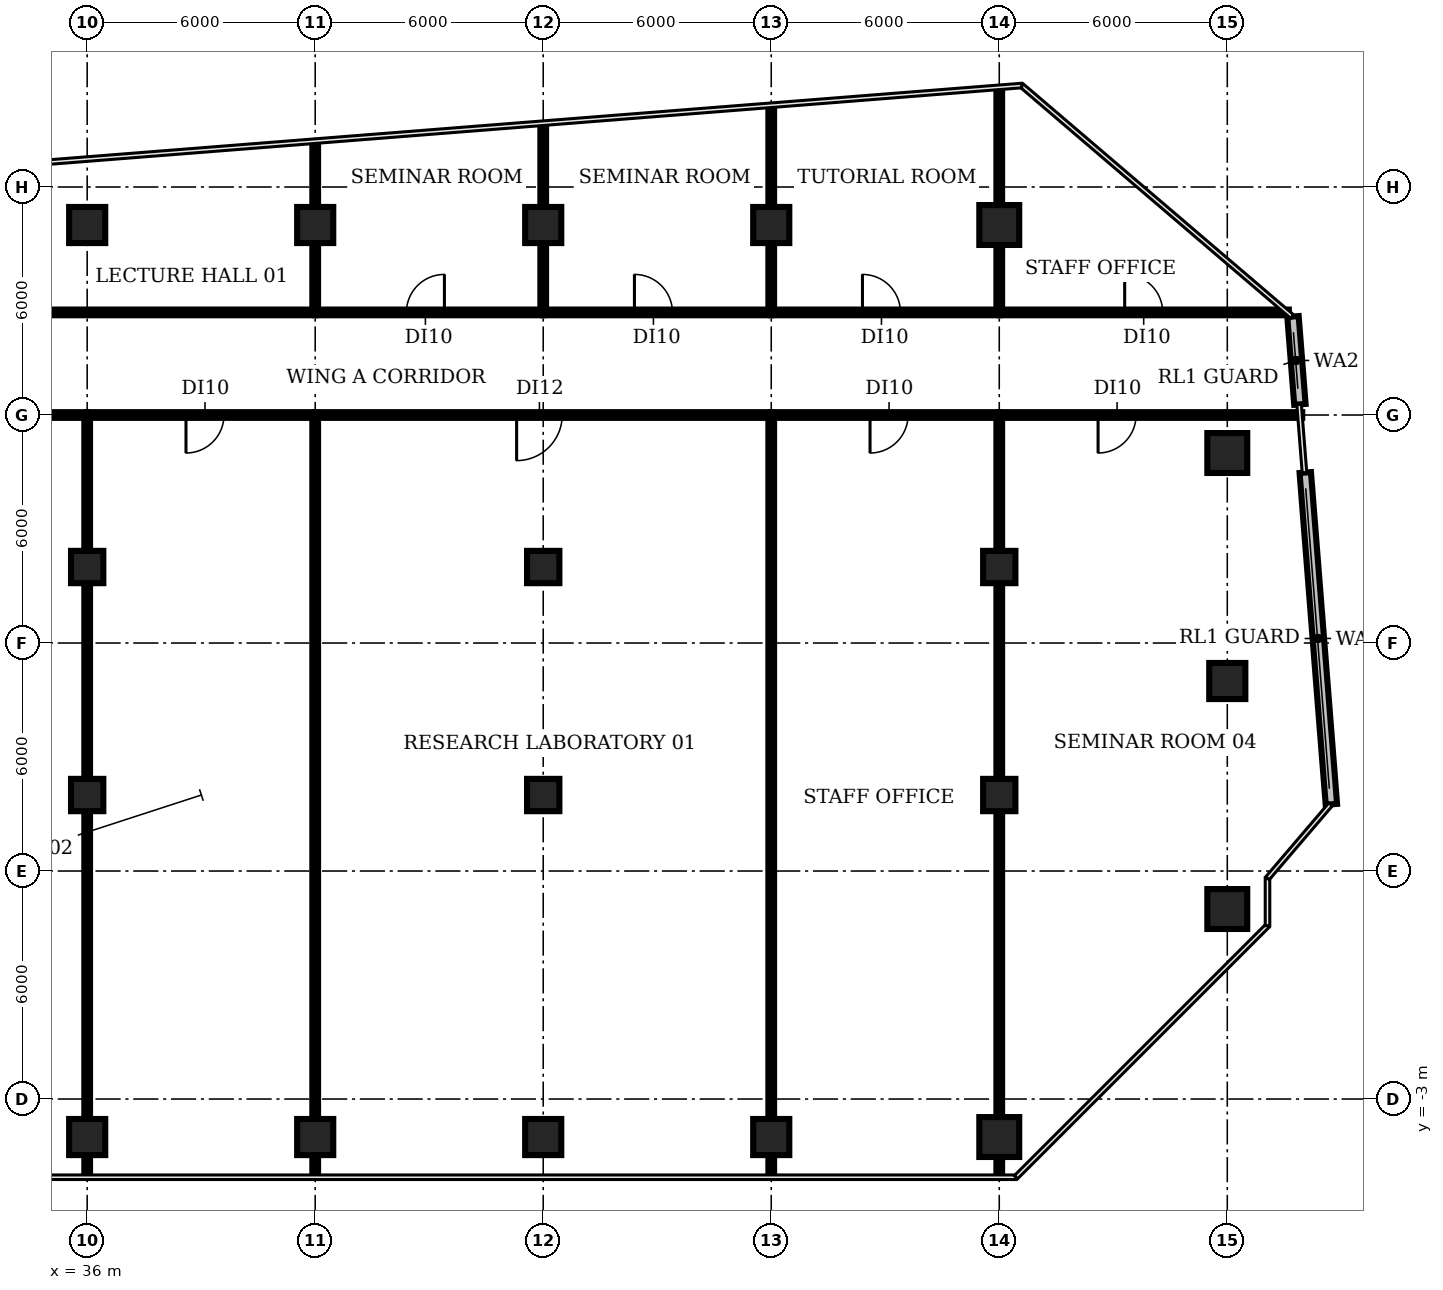
"""IFC4 building model, lengths in metres.
Left out: names, types, materials, properties, quantities, classifications, styles, units other than length and angle.
Written with IfcOpenShell. Run it as: python <this file> out.ifc"""

import sys

from ifc_helpers import new_model, si_unit, direction, frame, frame_2d, origin, origin_2d, place, context, subcontext, project, spatial, rectangle, circle, extrude, element, fill, save


model = new_model("IFC4")
c1 = context("Model", 3, precision=1e-05, world=origin(), true_north=direction((0.0, 1.0)))
c2 = subcontext(c1, "Body", "Model", "MODEL_VIEW")
j1 = project(units=[si_unit("LENGTHUNIT", "METRE"), si_unit("PLANEANGLEUNIT", "RADIAN")], contexts=[c1])
p1 = place(None, origin())
s1 = spatial("IfcSite", under=j1, at=p1, CompositionType="ELEMENT")
p2 = place(p1, origin())
s2 = spatial("IfcBuilding", under=s1, at=p2, CompositionType="ELEMENT")
p3 = place(p2, frame((0.0, 0.0, 71.0)))
s3 = spatial("IfcBuildingStorey", under=s2, at=p3, CompositionType="ELEMENT", Elevation=71.0)
p4 = place(p3, frame((36.0, -4.0, 0.0), z_axis=(0.0, 0.0, 1.0), x_axis=(1.0, 0.0, 0.0)))
e1 = element("IfcColumn", 1, at=p4, inside=s3, PredefinedType="COLUMN", context=c2, shape_type="SweptSolid", body=[
    extrude(rectangle(XDim=0.95, YDim=0.95, at=origin_2d()), origin(), (0.0, 0.0, 1.0), 3.85),
])
for number, where, z_axis, x_axis in (
    (2, (36.0, 5.0, 0.0), (0.0, 0.0, 1.0), (1.0, 0.0, 0.0)),
    (3, (36.0, 11.0, 0.0), (0.0, 0.0, 1.0), (1.0, 0.0, 0.0)),
):
    element("IfcColumn", number, at=place(p3, frame(where, z_axis=z_axis, x_axis=x_axis)), inside=s3, PredefinedType="COLUMN", context=c2, shape_type="SweptSolid", body=[
        extrude(rectangle(XDim=0.85, YDim=0.85, at=origin_2d()), origin(), (0.0, 0.0, 1.0), 3.85),
    ])
for number, where, z_axis, x_axis in (
    (4, (36.0, 20.0, 0.0), (0.0, 0.0, 1.0), (1.0, 0.0, 0.0)),
    (5, (42.0, -4.0, 0.0), (0.0, 0.0, 1.0), (1.0, 0.0, 0.0)),
    (6, (42.0, 20.0, 0.0), (0.0, 0.0, 1.0), (1.0, 0.0, 0.0)),
    (7, (48.0, -4.0, 0.0), (0.0, 0.0, 1.0), (1.0, 0.0, 0.0)),
):
    element("IfcColumn", number, at=place(p3, frame(where, z_axis=z_axis, x_axis=x_axis)), inside=s3, PredefinedType="COLUMN", context=c2, shape_type="SweptSolid", body=[
        extrude(rectangle(XDim=0.95, YDim=0.95, at=origin_2d()), origin(), (0.0, 0.0, 1.0), 3.85),
    ])
for number, where, z_axis, x_axis in (
    (8, (48.0, 5.0, 0.0), (0.0, 0.0, 1.0), (1.0, 0.0, 0.0)),
    (9, (48.0, 11.0, 0.0), (0.0, 0.0, 1.0), (1.0, 0.0, 0.0)),
):
    element("IfcColumn", number, at=place(p3, frame(where, z_axis=z_axis, x_axis=x_axis)), inside=s3, PredefinedType="COLUMN", context=c2, shape_type="SweptSolid", body=[
        extrude(rectangle(XDim=0.85, YDim=0.85, at=origin_2d()), origin(), (0.0, 0.0, 1.0), 3.85),
    ])
for number, where, z_axis, x_axis in (
    (10, (48.0, 20.0, 0.0), (0.0, 0.0, 1.0), (1.0, 0.0, 0.0)),
    (11, (54.0, -4.0, 0.0), (0.0, 0.0, 1.0), (1.0, 0.0, 0.0)),
    (12, (54.0, 20.0, 0.0), (0.0, 0.0, 1.0), (1.0, 0.0, 0.0)),
):
    element("IfcColumn", number, at=place(p3, frame(where, z_axis=z_axis, x_axis=x_axis)), inside=s3, PredefinedType="COLUMN", context=c2, shape_type="SweptSolid", body=[
        extrude(rectangle(XDim=0.95, YDim=0.95, at=origin_2d()), origin(), (0.0, 0.0, 1.0), 3.85),
    ])
p5 = place(p3, frame((60.0, -4.0, 0.0), z_axis=(0.0, 0.0, 1.0), x_axis=(1.0, 0.0, 0.0)))
e13 = element("IfcColumn", 13, at=p5, inside=s3, PredefinedType="COLUMN", context=c2, shape_type="SweptSolid", body=[
    extrude(circle(Radius=0.525, at=origin_2d()), origin(), (0.0, 0.0, 1.0), 3.85),
])
for number, where, z_axis, x_axis in (
    (14, (60.0, 5.0, 0.0), (0.0, 0.0, 1.0), (1.0, 0.0, 0.0)),
    (15, (60.0, 11.0, 0.0), (0.0, 0.0, 1.0), (1.0, 0.0, 0.0)),
):
    element("IfcColumn", number, at=place(p3, frame(where, z_axis=z_axis, x_axis=x_axis)), inside=s3, PredefinedType="COLUMN", context=c2, shape_type="SweptSolid", body=[
        extrude(rectangle(XDim=0.85, YDim=0.85, at=origin_2d()), origin(), (0.0, 0.0, 1.0), 3.85),
    ])
for number, where, z_axis, x_axis in (
    (16, (60.0, 20.0, 0.0), (0.0, 0.0, 1.0), (1.0, 0.0, 0.0)),
    (17, (66.0, 2.0, 0.0), (0.0, 0.0, 1.0), (1.0, 0.0, 0.0)),
):
    element("IfcColumn", number, at=place(p3, frame(where, z_axis=z_axis, x_axis=x_axis)), inside=s3, PredefinedType="COLUMN", context=c2, shape_type="SweptSolid", body=[
        extrude(circle(Radius=0.525, at=origin_2d()), origin(), (0.0, 0.0, 1.0), 3.85),
    ])
p6 = place(p3, frame((66.0, 8.0, 0.0), z_axis=(0.0, 0.0, 1.0), x_axis=(1.0, 0.0, 0.0)))
e18 = element("IfcColumn", 18, at=p6, inside=s3, PredefinedType="COLUMN", context=c2, shape_type="SweptSolid", body=[
    extrude(rectangle(XDim=0.95, YDim=0.95, at=origin_2d()), origin(), (0.0, 0.0, 1.0), 3.85),
])
p7 = place(p3, frame((66.0, 14.0, 0.0), z_axis=(0.0, 0.0, 1.0), x_axis=(1.0, 0.0, 0.0)))
e19 = element("IfcColumn", 19, at=p7, inside=s3, PredefinedType="COLUMN", context=c2, shape_type="SweptSolid", body=[
    extrude(circle(Radius=0.525, at=origin_2d()), origin(), (0.0, 0.0, 1.0), 3.85),
])
p8 = place(p3, frame((68.739, 4.755, 0.0), z_axis=(0.0, 0.0, 1.0), x_axis=(-0.07845094055, 0.996917975526, 0.0)))
e20 = element("IfcWall", 20, at=p8, inside=s3, PredefinedType="SOLIDWALL", context=c2, shape_type="SweptSolid", body=[
    extrude(rectangle(XDim=8.757, YDim=0.3, at=frame_2d((4.379, 0.0))), origin(), (0.0, 0.0, 1.0), 3.85),
])
p9 = place(p3, frame((67.911, 15.28, 0.0), z_axis=(0.0, 0.0, 1.0), x_axis=(-0.078427168451, 0.99691984595, 0.0)))
e21 = element("IfcWall", 21, at=p9, inside=s3, PredefinedType="SOLIDWALL", context=c2, shape_type="SweptSolid", body=[
    extrude(rectangle(XDim=2.319, YDim=0.3, at=frame_2d((1.16, 0.0))), origin(), (0.0, 0.0, 1.0), 3.85),
])
p10 = place(p3, frame((27.6, 15.0, 0.0), z_axis=(0.0, 0.0, 1.0), x_axis=(1.0, 0.0, 0.0)))
e22 = element("IfcWall", 22, at=p10, inside=s3, PredefinedType="PARTITIONING", context=c2, shape_type="SweptSolid", body=[
    extrude(rectangle(XDim=8.4, YDim=0.15, at=frame_2d((4.2, 0.0))), origin(), (0.0, 0.0, 1.0), 2.83),
])
for number, where, z_axis, x_axis in (
    (23, (36.0, -5.01, 0.0), (0.0, 0.0, 1.0), (0.0, 1.0, 0.0)),
    (24, (42.0, -5.01, 0.0), (0.0, 0.0, 1.0), (0.0, 1.0, 0.0)),
):
    element("IfcWall", number, at=place(p3, frame(where, z_axis=z_axis, x_axis=x_axis)), inside=s3, PredefinedType="PARTITIONING", context=c2, shape_type="SweptSolid", body=[
        extrude(rectangle(XDim=20.01, YDim=0.15, at=frame_2d((10.005, 0.0))), origin(), (0.0, 0.0, 1.0), 2.83),
    ])
p11 = place(p3, frame((42.0, 15.0, 0.0), z_axis=(0.0, 0.0, 1.0), x_axis=(-1.0, 0.0, 0.0)))
e25 = element("IfcWall", 25, at=p11, inside=s3, PredefinedType="PARTITIONING", context=c2, shape_type="SweptSolid", body=[
    extrude(rectangle(XDim=6.0, YDim=0.15, at=frame_2d((3.0, 0.0))), origin(), (0.0, 0.0, 1.0), 2.83),
])
p12 = place(p11, frame((2.4, 0.0, 0.0)))
e26 = element("IfcOpeningElement", 26, at=p12, cuts=e25, PredefinedType="OPENING", context=c2, shape_type="SweptSolid", body=[
    extrude(rectangle(XDim=1.0, YDim=2.1, at=frame_2d((0.5, 1.05))), frame((0.0, 0.085, 0.0), z_axis=(0.0, -1.0, 0.0), x_axis=(1.0, 0.0, 0.0)), (0.0, 0.0, 1.0), 0.17),
])
p13 = place(p3, frame((42.0, 17.7, 0.0), z_axis=(0.0, 0.0, 1.0), x_axis=(-1.0, 0.0, 0.0)))
e27 = element("IfcWall", 27, at=p13, inside=s3, PredefinedType="PARTITIONING", context=c2, shape_type="SweptSolid", body=[
    extrude(rectangle(XDim=14.4, YDim=0.15, at=frame_2d((7.2, 0.0))), origin(), (0.0, 0.0, 1.0), 2.83),
])
p14 = place(p13, frame((7.1, 0.0, 0.0)))
e28 = element("IfcOpeningElement", 28, at=p14, cuts=e27, PredefinedType="OPENING", context=c2, shape_type="SweptSolid", body=[
    extrude(rectangle(XDim=1.8, YDim=2.1, at=frame_2d((0.9, 1.05))), frame((0.0, 0.085, 0.0), z_axis=(0.0, -1.0, 0.0), x_axis=(1.0, 0.0, 0.0)), (0.0, 0.0, 1.0), 0.17),
])
p15 = place(p3, frame((42.0, 17.7, 0.0), z_axis=(0.0, 0.0, 1.0), x_axis=(0.0, 1.0, 0.0)))
e29 = element("IfcWall", 29, at=p15, inside=s3, PredefinedType="PARTITIONING", context=c2, shape_type="SweptSolid", body=[
    extrude(rectangle(XDim=4.46, YDim=0.15, at=frame_2d((2.23, 0.0))), origin(), (0.0, 0.0, 1.0), 2.83),
])
p16 = place(p3, frame((42.0, 17.7, 0.0), z_axis=(0.0, 0.0, 1.0), x_axis=(1.0, 0.0, 0.0)))
e30 = element("IfcWall", 30, at=p16, inside=s3, PredefinedType="PARTITIONING", context=c2, shape_type="SweptSolid", body=[
    extrude(rectangle(XDim=6.0, YDim=0.15, at=frame_2d((3.0, 0.0))), origin(), (0.0, 0.0, 1.0), 2.83),
])
p17 = place(p16, frame((2.4, 0.0, 0.0)))
e31 = element("IfcOpeningElement", 31, at=p17, cuts=e30, PredefinedType="OPENING", context=c2, shape_type="SweptSolid", body=[
    extrude(rectangle(XDim=1.0, YDim=2.1, at=frame_2d((0.5, 1.05))), frame((0.0, 0.085, 0.0), z_axis=(0.0, -1.0, 0.0), x_axis=(1.0, 0.0, 0.0)), (0.0, 0.0, 1.0), 0.17),
])
p18 = place(p3, frame((48.0, 17.7, 0.0), z_axis=(0.0, 0.0, 1.0), x_axis=(0.0, 1.0, 0.0)))
e32 = element("IfcWall", 32, at=p18, inside=s3, PredefinedType="PARTITIONING", context=c2, shape_type="SweptSolid", body=[
    extrude(rectangle(XDim=4.93, YDim=0.15, at=frame_2d((2.465, 0.0))), origin(), (0.0, 0.0, 1.0), 2.83),
])
p19 = place(p3, frame((48.0, 17.7, 0.0), z_axis=(0.0, 0.0, 1.0), x_axis=(1.0, 0.0, 0.0)))
e33 = element("IfcWall", 33, at=p19, inside=s3, PredefinedType="PARTITIONING", context=c2, shape_type="SweptSolid", body=[
    extrude(rectangle(XDim=6.0, YDim=0.15, at=frame_2d((3.0, 0.0))), origin(), (0.0, 0.0, 1.0), 2.83),
])
p20 = place(p19, frame((2.4, 0.0, 0.0)))
e34 = element("IfcOpeningElement", 34, at=p20, cuts=e33, PredefinedType="OPENING", context=c2, shape_type="SweptSolid", body=[
    extrude(rectangle(XDim=1.0, YDim=2.1, at=frame_2d((0.5, 1.05))), frame((0.0, 0.085, 0.0), z_axis=(0.0, -1.0, 0.0), x_axis=(1.0, 0.0, 0.0)), (0.0, 0.0, 1.0), 0.17),
])
p21 = place(p3, frame((54.0, -4.993, 0.0), z_axis=(0.0, 0.0, 1.0), x_axis=(0.0, 1.0, 0.0)))
e35 = element("IfcWall", 35, at=p21, inside=s3, PredefinedType="PARTITIONING", context=c2, shape_type="SweptSolid", body=[
    extrude(rectangle(XDim=19.993, YDim=0.15, at=frame_2d((9.997, 0.0))), origin(), (0.0, 0.0, 1.0), 2.83),
])
p22 = place(p3, frame((54.0, 15.0, 0.0), z_axis=(0.0, 0.0, 1.0), x_axis=(-1.0, 0.0, 0.0)))
e36 = element("IfcWall", 36, at=p22, inside=s3, PredefinedType="PARTITIONING", context=c2, shape_type="SweptSolid", body=[
    extrude(rectangle(XDim=12.0, YDim=0.15, at=frame_2d((6.0, 0.0))), origin(), (0.0, 0.0, 1.0), 2.83),
])
p23 = place(p22, frame((5.5, 0.0, 0.0)))
e37 = element("IfcOpeningElement", 37, at=p23, cuts=e36, PredefinedType="OPENING", context=c2, shape_type="SweptSolid", body=[
    extrude(rectangle(XDim=1.2, YDim=2.1, at=frame_2d((0.6, 1.05))), frame((0.0, 0.085, 0.0), z_axis=(0.0, -1.0, 0.0), x_axis=(1.0, 0.0, 0.0)), (0.0, 0.0, 1.0), 0.17),
])
p24 = place(p3, frame((54.0, 17.7, 0.0), z_axis=(0.0, 0.0, 1.0), x_axis=(0.0, 1.0, 0.0)))
e38 = element("IfcWall", 38, at=p24, inside=s3, PredefinedType="PARTITIONING", context=c2, shape_type="SweptSolid", body=[
    extrude(rectangle(XDim=5.4, YDim=0.15, at=frame_2d((2.7, 0.0))), origin(), (0.0, 0.0, 1.0), 2.83),
])
p25 = place(p3, frame((54.0, 17.7, 0.0), z_axis=(0.0, 0.0, 1.0), x_axis=(1.0, 0.0, 0.0)))
e39 = element("IfcWall", 39, at=p25, inside=s3, PredefinedType="PARTITIONING", context=c2, shape_type="SweptSolid", body=[
    extrude(rectangle(XDim=6.0, YDim=0.15, at=frame_2d((3.0, 0.0))), origin(), (0.0, 0.0, 1.0), 2.83),
])
p26 = place(p25, frame((2.4, 0.0, 0.0)))
e40 = element("IfcOpeningElement", 40, at=p26, cuts=e39, PredefinedType="OPENING", context=c2, shape_type="SweptSolid", body=[
    extrude(rectangle(XDim=1.0, YDim=2.1, at=frame_2d((0.5, 1.05))), frame((0.0, 0.085, 0.0), z_axis=(0.0, -1.0, 0.0), x_axis=(1.0, 0.0, 0.0)), (0.0, 0.0, 1.0), 0.17),
])
p27 = place(p3, frame((60.0, -5.01, 0.0), z_axis=(0.0, 0.0, 1.0), x_axis=(0.0, 1.0, 0.0)))
e41 = element("IfcWall", 41, at=p27, inside=s3, PredefinedType="PARTITIONING", context=c2, shape_type="SweptSolid", body=[
    extrude(rectangle(XDim=20.01, YDim=0.15, at=frame_2d((10.005, 0.0))), origin(), (0.0, 0.0, 1.0), 2.83),
])
p28 = place(p3, frame((60.0, 15.0, 0.0), z_axis=(0.0, 0.0, 1.0), x_axis=(-1.0, 0.0, 0.0)))
e42 = element("IfcWall", 42, at=p28, inside=s3, PredefinedType="PARTITIONING", context=c2, shape_type="SweptSolid", body=[
    extrude(rectangle(XDim=6.0, YDim=0.15, at=frame_2d((3.0, 0.0))), origin(), (0.0, 0.0, 1.0), 2.83),
])
p29 = place(p28, frame((2.4, 0.0, 0.0)))
e43 = element("IfcOpeningElement", 43, at=p29, cuts=e42, PredefinedType="OPENING", context=c2, shape_type="SweptSolid", body=[
    extrude(rectangle(XDim=1.0, YDim=2.1, at=frame_2d((0.5, 1.05))), frame((0.0, 0.085, 0.0), z_axis=(0.0, -1.0, 0.0), x_axis=(1.0, 0.0, 0.0)), (0.0, 0.0, 1.0), 0.17),
])
p30 = place(p3, frame((60.0, 17.7, 0.0), z_axis=(0.0, 0.0, 1.0), x_axis=(0.0, 1.0, 0.0)))
e44 = element("IfcWall", 44, at=p30, inside=s3, PredefinedType="PARTITIONING", context=c2, shape_type="SweptSolid", body=[
    extrude(rectangle(XDim=5.87, YDim=0.15, at=frame_2d((2.935, 0.0))), origin(), (0.0, 0.0, 1.0), 2.83),
])
p31 = place(p3, frame((60.0, 17.7, 0.0), z_axis=(0.0, 0.0, 1.0), x_axis=(1.0, 0.0, 0.0)))
e45 = element("IfcWall", 45, at=p31, inside=s3, PredefinedType="PARTITIONING", context=c2, shape_type="SweptSolid", body=[
    extrude(rectangle(XDim=7.62, YDim=0.15, at=frame_2d((3.81, 0.0))), origin(), (0.0, 0.0, 1.0), 2.83),
])
p32 = place(p31, frame((3.3, 0.0, 0.0)))
e46 = element("IfcOpeningElement", 46, at=p32, cuts=e45, PredefinedType="OPENING", context=c2, shape_type="SweptSolid", body=[
    extrude(rectangle(XDim=1.0, YDim=2.1, at=frame_2d((0.5, 1.05))), frame((0.0, 0.085, 0.0), z_axis=(0.0, -1.0, 0.0), x_axis=(1.0, 0.0, 0.0)), (0.0, 0.0, 1.0), 0.17),
])
p33 = place(p3, frame((67.972, 15.0, 0.0), z_axis=(0.0, 0.0, 1.0), x_axis=(-1.0, 0.0, 0.0)))
e47 = element("IfcWall", 47, at=p33, inside=s3, PredefinedType="PARTITIONING", context=c2, shape_type="SweptSolid", body=[
    extrude(rectangle(XDim=7.972, YDim=0.15, at=frame_2d((3.986, 0.0))), origin(), (0.0, 0.0, 1.0), 2.83),
])
p34 = place(p33, frame((4.372, 0.0, 0.0)))
e48 = element("IfcOpeningElement", 48, at=p34, cuts=e47, PredefinedType="OPENING", context=c2, shape_type="SweptSolid", body=[
    extrude(rectangle(XDim=1.0, YDim=2.1, at=frame_2d((0.5, 1.05))), frame((0.0, 0.085, 0.0), z_axis=(0.0, -1.0, 0.0), x_axis=(1.0, 0.0, 0.0)), (0.0, 0.0, 1.0), 0.17),
])
p35 = place(p12, origin())
e49 = element("IfcDoor", 49, at=p35, inside=s3, OperationType="SINGLE_SWING_RIGHT", PredefinedType="DOOR", context=c2, shape_type="SweptSolid", body=[
    extrude(rectangle(XDim=1.0, YDim=2.1, at=frame_2d((0.5, 1.05))), frame((0.0, 0.025, 0.0), z_axis=(0.0, -1.0, 0.0), x_axis=(1.0, 0.0, 0.0)), (0.0, 0.0, 1.0), 0.05),
])
fill(e26, e49)
p36 = place(p17, origin())
e50 = element("IfcDoor", 50, at=p36, inside=s3, OperationType="SINGLE_SWING_RIGHT", PredefinedType="DOOR", context=c2, shape_type="SweptSolid", body=[
    extrude(rectangle(XDim=1.0, YDim=2.1, at=frame_2d((0.5, 1.05))), frame((0.0, 0.025, 0.0), z_axis=(0.0, -1.0, 0.0), x_axis=(1.0, 0.0, 0.0)), (0.0, 0.0, 1.0), 0.05),
])
fill(e31, e50)
p37 = place(p20, origin())
e51 = element("IfcDoor", 51, at=p37, inside=s3, OperationType="SINGLE_SWING_LEFT", PredefinedType="DOOR", context=c2, shape_type="SweptSolid", body=[
    extrude(rectangle(XDim=1.0, YDim=2.1, at=frame_2d((0.5, 1.05))), frame((0.0, 0.025, 0.0), z_axis=(0.0, -1.0, 0.0), x_axis=(1.0, 0.0, 0.0)), (0.0, 0.0, 1.0), 0.05),
])
fill(e34, e51)
p38 = place(p23, origin())
e52 = element("IfcDoor", 52, at=p38, inside=s3, OperationType="SINGLE_SWING_RIGHT", PredefinedType="DOOR", context=c2, shape_type="SweptSolid", body=[
    extrude(rectangle(XDim=1.2, YDim=2.1, at=frame_2d((0.6, 1.05))), frame((0.0, 0.025, 0.0), z_axis=(0.0, -1.0, 0.0), x_axis=(1.0, 0.0, 0.0)), (0.0, 0.0, 1.0), 0.05),
])
fill(e37, e52)
p39 = place(p26, origin())
e53 = element("IfcDoor", 53, at=p39, inside=s3, OperationType="SINGLE_SWING_LEFT", PredefinedType="DOOR", context=c2, shape_type="SweptSolid", body=[
    extrude(rectangle(XDim=1.0, YDim=2.1, at=frame_2d((0.5, 1.05))), frame((0.0, 0.025, 0.0), z_axis=(0.0, -1.0, 0.0), x_axis=(1.0, 0.0, 0.0)), (0.0, 0.0, 1.0), 0.05),
])
fill(e40, e53)
p40 = place(p29, origin())
e54 = element("IfcDoor", 54, at=p40, inside=s3, OperationType="SINGLE_SWING_RIGHT", PredefinedType="DOOR", context=c2, shape_type="SweptSolid", body=[
    extrude(rectangle(XDim=1.0, YDim=2.1, at=frame_2d((0.5, 1.05))), frame((0.0, 0.025, 0.0), z_axis=(0.0, -1.0, 0.0), x_axis=(1.0, 0.0, 0.0)), (0.0, 0.0, 1.0), 0.05),
])
fill(e43, e54)
p41 = place(p32, origin())
e55 = element("IfcDoor", 55, at=p41, inside=s3, OperationType="SINGLE_SWING_LEFT", PredefinedType="DOOR", context=c2, shape_type="SweptSolid", body=[
    extrude(rectangle(XDim=1.0, YDim=2.1, at=frame_2d((0.5, 1.05))), frame((0.0, 0.025, 0.0), z_axis=(0.0, -1.0, 0.0), x_axis=(1.0, 0.0, 0.0)), (0.0, 0.0, 1.0), 0.05),
])
fill(e46, e55)
p42 = place(p34, origin())
e56 = element("IfcDoor", 56, at=p42, inside=s3, OperationType="SINGLE_SWING_RIGHT", PredefinedType="DOOR", context=c2, shape_type="SweptSolid", body=[
    extrude(rectangle(XDim=1.0, YDim=2.1, at=frame_2d((0.5, 1.05))), frame((0.0, 0.025, 0.0), z_axis=(0.0, -1.0, 0.0), x_axis=(1.0, 0.0, 0.0)), (0.0, 0.0, 1.0), 0.05),
])
fill(e48, e56)
save(model, sys.argv[1])
